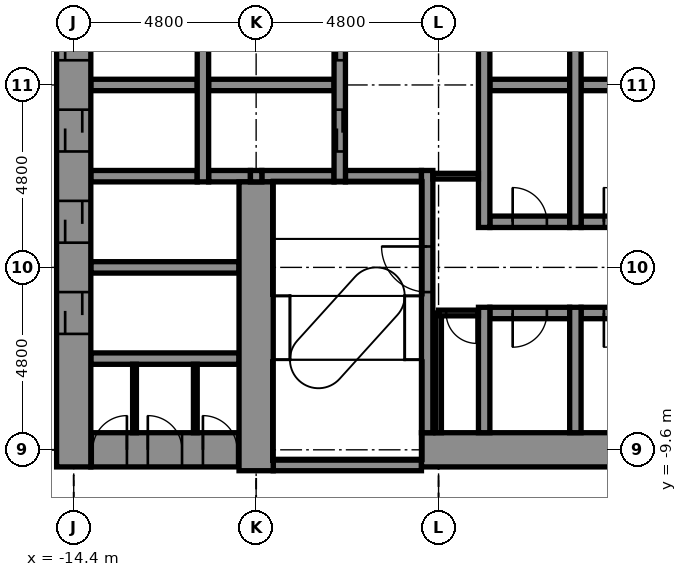
"""IFC4 building model, lengths in metres.
Left out: names, types, materials, properties, quantities, classifications, styles, units other than length and angle.
Written with IfcOpenShell. Run it as: python <this file> out.ifc"""

import sys

from ifc_helpers import new_model, si_unit, direction, frame, frame_2d, origin, place, context, subcontext, project, spatial, rectangle, extrude, element, fill, save


model = new_model("IFC4")
c1 = context("Model", 3, precision=1e-05, world=origin(), true_north=direction((0.0, 1.0)))
c2 = subcontext(c1, "Body", "Model", "MODEL_VIEW")
j1 = project(units=[si_unit("LENGTHUNIT", "METRE"), si_unit("PLANEANGLEUNIT", "RADIAN")], contexts=[c1])
p1 = place(None, origin())
s1 = spatial("IfcSite", under=j1, at=p1, CompositionType="ELEMENT")
p2 = place(p1, origin())
s2 = spatial("IfcBuilding", under=s1, at=p2, CompositionType="ELEMENT")
p3 = place(p2, frame((0.0, 0.0, 122.9)))
s3 = spatial("IfcBuildingStorey", under=s2, at=p3, CompositionType="ELEMENT", Elevation=122.9)
p4 = place(p3, frame((-9.15, -10.0, -0.2), z_axis=(0.0, 0.0, 1.0), x_axis=(1.0, 0.0, 0.0)))
e1 = element("IfcWall", 1, at=p4, inside=s3, PredefinedType="STANDARD", context=c2, shape_type="SweptSolid", body=[
    extrude(rectangle(XDim=3.9, YDim=0.3, at=frame_2d((1.95, 0.0))), origin(), (0.0, 0.0, 1.0), 4.4),
])
p5 = place(p3, frame((-13.95, -9.6, -0.2), z_axis=(0.0, 0.0, 1.0), x_axis=(1.0, 0.0, 0.0)))
e2 = element("IfcWall", 2, at=p5, inside=s3, PredefinedType="SHEAR", context=c2, shape_type="SweptSolid", body=[
    extrude(rectangle(XDim=3.9, YDim=0.9, at=frame_2d((1.95, 0.0))), origin(), (0.0, 0.0, 1.0), 4.4),
])
p6 = place(p5, frame((0.05, 0.0, 0.2)))
e3 = element("IfcOpeningElement", 3, at=p6, cuts=e2, PredefinedType="OPENING", context=c2, shape_type="SweptSolid", body=[
    extrude(rectangle(XDim=0.9, YDim=2.1, at=frame_2d((0.45, 1.05))), frame((0.0, 0.46, 0.0), z_axis=(0.0, -1.0, 0.0), x_axis=(1.0, 0.0, 0.0)), (0.0, 0.0, 1.0), 0.92),
])
p7 = place(p5, frame((1.5, 0.0, 0.2)))
e4 = element("IfcOpeningElement", 4, at=p7, cuts=e2, PredefinedType="OPENING", context=c2, shape_type="SweptSolid", body=[
    extrude(rectangle(XDim=0.9, YDim=2.1, at=frame_2d((0.45, 1.05))), frame((0.0, 0.46, 0.0), z_axis=(0.0, -1.0, 0.0), x_axis=(1.0, 0.0, 0.0)), (0.0, 0.0, 1.0), 0.92),
])
p8 = place(p5, frame((2.95, 0.0, 0.2)))
e5 = element("IfcOpeningElement", 5, at=p8, cuts=e2, PredefinedType="OPENING", context=c2, shape_type="SweptSolid", body=[
    extrude(rectangle(XDim=0.9, YDim=2.1, at=frame_2d((0.45, 1.05))), frame((0.0, 0.46, 0.0), z_axis=(0.0, -1.0, 0.0), x_axis=(1.0, 0.0, 0.0)), (0.0, 0.0, 1.0), 0.92),
])
p9 = place(p3, frame((-5.25, -9.6, -0.2), z_axis=(0.0, 0.0, 1.0), x_axis=(1.0, 0.0, 0.0)))
e6 = element("IfcWall", 6, at=p9, inside=s3, PredefinedType="SHEAR", context=c2, shape_type="SweptSolid", body=[
    extrude(rectangle(XDim=10.2, YDim=0.9, at=frame_2d((5.1, 0.0))), origin(), (0.0, 0.0, 1.0), 4.4),
])
p10 = place(p9, frame((9.0, 0.0, 0.2)))
e7 = element("IfcOpeningElement", 7, at=p10, cuts=e6, PredefinedType="OPENING", context=c2, shape_type="SweptSolid", body=[
    extrude(rectangle(XDim=0.9, YDim=2.1, at=frame_2d((0.45, 1.05))), frame((0.0, 0.46, 0.0), z_axis=(0.0, -1.0, 0.0), x_axis=(1.0, 0.0, 0.0)), (0.0, 0.0, 1.0), 0.92),
])
p11 = place(p3, frame((-13.95, -7.2, -0.2), z_axis=(0.0, 0.0, 1.0), x_axis=(1.0, 0.0, 0.0)))
e8 = element("IfcWall", 8, at=p11, inside=s3, PredefinedType="STANDARD", context=c2, shape_type="SweptSolid", body=[
    extrude(rectangle(XDim=3.9, YDim=0.3, at=frame_2d((1.95, 0.0))), origin(), (0.0, 0.0, 1.0), 4.4),
])
p12 = place(p3, frame((-3.45, -6.0, -0.2), z_axis=(0.0, 0.0, 1.0), x_axis=(1.0, 0.0, 0.0)))
e9 = element("IfcWall", 9, at=p12, inside=s3, PredefinedType="STANDARD", context=c2, shape_type="SweptSolid", body=[
    extrude(rectangle(XDim=2.1, YDim=0.3, at=frame_2d((1.05, 0.0))), origin(), (0.0, 0.0, 1.0), 4.4),
])
p13 = place(p12, frame((0.6, 0.0, 0.2)))
e10 = element("IfcOpeningElement", 10, at=p13, cuts=e9, PredefinedType="OPENING", context=c2, shape_type="SweptSolid", body=[
    extrude(rectangle(XDim=0.9, YDim=2.1, at=frame_2d((0.45, 1.05))), frame((0.0, 0.16, 0.0), z_axis=(0.0, -1.0, 0.0), x_axis=(1.0, 0.0, 0.0)), (0.0, 0.0, 1.0), 0.32),
])
p14 = place(p3, frame((-1.05, -6.0, -0.2), z_axis=(0.0, 0.0, 1.0), x_axis=(1.0, 0.0, 0.0)))
e11 = element("IfcWall", 11, at=p14, inside=s3, PredefinedType="STANDARD", context=c2, shape_type="SweptSolid", body=[
    extrude(rectangle(XDim=2.1, YDim=0.3, at=frame_2d((1.05, 0.0))), origin(), (0.0, 0.0, 1.0), 4.4),
])
p15 = place(p14, frame((0.6, 0.0, 0.2)))
e12 = element("IfcOpeningElement", 12, at=p15, cuts=e11, PredefinedType="OPENING", context=c2, shape_type="SweptSolid", body=[
    extrude(rectangle(XDim=0.9, YDim=2.1, at=frame_2d((0.45, 1.05))), frame((0.0, 0.16, 0.0), z_axis=(0.0, -1.0, 0.0), x_axis=(1.0, 0.0, 0.0)), (0.0, 0.0, 1.0), 0.32),
])
p16 = place(p3, frame((-13.95, -4.8, -0.2), z_axis=(0.0, 0.0, 1.0), x_axis=(1.0, 0.0, 0.0)))
e13 = element("IfcWall", 13, at=p16, inside=s3, PredefinedType="STANDARD", context=c2, shape_type="SweptSolid", body=[
    extrude(rectangle(XDim=3.9, YDim=0.3, at=frame_2d((1.95, 0.0))), origin(), (0.0, 0.0, 1.0), 4.4),
])
p17 = place(p3, frame((-3.45, -3.6, -0.2), z_axis=(0.0, 0.0, 1.0), x_axis=(1.0, 0.0, 0.0)))
e14 = element("IfcWall", 14, at=p17, inside=s3, PredefinedType="STANDARD", context=c2, shape_type="SweptSolid", body=[
    extrude(rectangle(XDim=2.1, YDim=0.3, at=frame_2d((1.05, 0.0))), origin(), (0.0, 0.0, 1.0), 4.4),
])
p18 = place(p17, frame((0.6, 0.0, 0.2)))
e15 = element("IfcOpeningElement", 15, at=p18, cuts=e14, PredefinedType="OPENING", context=c2, shape_type="SweptSolid", body=[
    extrude(rectangle(XDim=0.9, YDim=2.1, at=frame_2d((0.45, 1.05))), frame((0.0, 0.16, 0.0), z_axis=(0.0, -1.0, 0.0), x_axis=(1.0, 0.0, 0.0)), (0.0, 0.0, 1.0), 0.32),
])
p19 = place(p3, frame((-1.05, -3.6, -0.2), z_axis=(0.0, 0.0, 1.0), x_axis=(1.0, 0.0, 0.0)))
e16 = element("IfcWall", 16, at=p19, inside=s3, PredefinedType="STANDARD", context=c2, shape_type="SweptSolid", body=[
    extrude(rectangle(XDim=2.1, YDim=0.3, at=frame_2d((1.05, 0.0))), origin(), (0.0, 0.0, 1.0), 4.4),
])
p20 = place(p19, frame((0.6, 0.0, 0.2)))
e17 = element("IfcOpeningElement", 17, at=p20, cuts=e16, PredefinedType="OPENING", context=c2, shape_type="SweptSolid", body=[
    extrude(rectangle(XDim=0.9, YDim=2.1, at=frame_2d((0.45, 1.05))), frame((0.0, 0.16, 0.0), z_axis=(0.0, -1.0, 0.0), x_axis=(1.0, 0.0, 0.0)), (0.0, 0.0, 1.0), 0.32),
])
p21 = place(p3, frame((-13.95, -2.4, -0.2), z_axis=(0.0, 0.0, 1.0), x_axis=(1.0, 0.0, 0.0)))
e18 = element("IfcWall", 18, at=p21, inside=s3, PredefinedType="STANDARD", context=c2, shape_type="SweptSolid", body=[
    extrude(rectangle(XDim=2.8, YDim=0.3, at=frame_2d((1.4, 0.0))), origin(), (0.0, 0.0, 1.0), 4.4),
])
p22 = place(p3, frame((-10.85, -2.4, -0.2), z_axis=(0.0, 0.0, 1.0), x_axis=(1.0, 0.0, 0.0)))
e19 = element("IfcWall", 19, at=p22, inside=s3, PredefinedType="STANDARD", context=c2, shape_type="SweptSolid", body=[
    extrude(rectangle(XDim=1.1, YDim=0.3, at=frame_2d((0.55, 0.0))), origin(), (0.0, 0.0, 1.0), 4.4),
])
p23 = place(p3, frame((-9.45, -2.4, -0.2), z_axis=(0.0, 0.0, 1.0), x_axis=(1.0, 0.0, 0.0)))
e20 = element("IfcWall", 20, at=p23, inside=s3, PredefinedType="STANDARD", context=c2, shape_type="SweptSolid", body=[
    extrude(rectangle(XDim=1.9, YDim=0.3, at=frame_2d((0.95, 0.0))), origin(), (0.0, 0.0, 1.0), 4.4),
])
p24 = place(p3, frame((-7.25, -2.4, -0.2), z_axis=(0.0, 0.0, 1.0), x_axis=(1.0, 0.0, 0.0)))
e21 = element("IfcWall", 21, at=p24, inside=s3, PredefinedType="STANDARD", context=c2, shape_type="SweptSolid", body=[
    extrude(rectangle(XDim=2.0, YDim=0.3, at=frame_2d((1.0, 0.0))), origin(), (0.0, 0.0, 1.0), 4.4),
])
p25 = place(p3, frame((-13.95, 0.0, -0.2), z_axis=(0.0, 0.0, 1.0), x_axis=(1.0, 0.0, 0.0)))
e22 = element("IfcWall", 22, at=p25, inside=s3, PredefinedType="STANDARD", context=c2, shape_type="SweptSolid", body=[
    extrude(rectangle(XDim=2.8, YDim=0.3, at=frame_2d((1.4, 0.0))), origin(), (0.0, 0.0, 1.0), 4.4),
])
p26 = place(p3, frame((-10.85, 0.0, -0.2), z_axis=(0.0, 0.0, 1.0), x_axis=(1.0, 0.0, 0.0)))
e23 = element("IfcWall", 23, at=p26, inside=s3, PredefinedType="STANDARD", context=c2, shape_type="SweptSolid", body=[
    extrude(rectangle(XDim=3.3, YDim=0.3, at=frame_2d((1.65, 0.0))), origin(), (0.0, 0.0, 1.0), 4.4),
])
p27 = place(p3, frame((-3.45, 0.0, -0.2), z_axis=(0.0, 0.0, 1.0), x_axis=(1.0, 0.0, 0.0)))
e24 = element("IfcWall", 24, at=p27, inside=s3, PredefinedType="STANDARD", context=c2, shape_type="SweptSolid", body=[
    extrude(rectangle(XDim=2.1, YDim=0.3, at=frame_2d((1.05, 0.0))), origin(), (0.0, 0.0, 1.0), 4.4),
])
p28 = place(p3, frame((-1.05, 0.0, -0.2), z_axis=(0.0, 0.0, 1.0), x_axis=(1.0, 0.0, 0.0)))
e25 = element("IfcWall", 25, at=p28, inside=s3, PredefinedType="STANDARD", context=c2, shape_type="SweptSolid", body=[
    extrude(rectangle(XDim=2.1, YDim=0.3, at=frame_2d((1.05, 0.0))), origin(), (0.0, 0.0, 1.0), 4.4),
])
p29 = place(p3, frame((-14.4, -10.05, -0.2), z_axis=(0.0, 0.0, 1.0), x_axis=(0.0, 1.0, 0.0)))
e26 = element("IfcWall", 26, at=p29, inside=s3, PredefinedType="SHEAR", context=c2, shape_type="SweptSolid", body=[
    extrude(rectangle(XDim=20.1, YDim=0.9, at=frame_2d((10.05, 0.0))), origin(), (0.0, 0.0, 1.0), 4.4),
])
p30 = place(p29, frame((3.5, 0.0, 0.2)))
e27 = element("IfcOpeningElement", 27, at=p30, cuts=e26, PredefinedType="OPENING", context=c2, shape_type="SweptSolid", body=[
    extrude(rectangle(XDim=1.1, YDim=2.1, at=frame_2d((0.55, 1.05))), frame((0.0, 0.46, 0.0), z_axis=(0.0, -1.0, 0.0), x_axis=(1.0, 0.0, 0.0)), (0.0, 0.0, 1.0), 0.92),
])
p31 = place(p29, frame((5.9, 0.0, 0.2)))
e28 = element("IfcOpeningElement", 28, at=p31, cuts=e26, PredefinedType="OPENING", context=c2, shape_type="SweptSolid", body=[
    extrude(rectangle(XDim=1.1, YDim=2.1, at=frame_2d((0.55, 1.05))), frame((0.0, 0.46, 0.0), z_axis=(0.0, -1.0, 0.0), x_axis=(1.0, 0.0, 0.0)), (0.0, 0.0, 1.0), 0.92),
])
p32 = place(p29, frame((8.3, 0.0, 0.2)))
e29 = element("IfcOpeningElement", 29, at=p32, cuts=e26, PredefinedType="OPENING", context=c2, shape_type="SweptSolid", body=[
    extrude(rectangle(XDim=1.1, YDim=2.1, at=frame_2d((0.55, 1.05))), frame((0.0, 0.46, 0.0), z_axis=(0.0, -1.0, 0.0), x_axis=(1.0, 0.0, 0.0)), (0.0, 0.0, 1.0), 0.92),
])
p33 = place(p29, frame((10.7, 0.0, 0.2)))
e30 = element("IfcOpeningElement", 30, at=p33, cuts=e26, PredefinedType="OPENING", context=c2, shape_type="SweptSolid", body=[
    extrude(rectangle(XDim=1.1, YDim=2.1, at=frame_2d((0.55, 1.05))), frame((0.0, 0.46, 0.0), z_axis=(0.0, -1.0, 0.0), x_axis=(1.0, 0.0, 0.0)), (0.0, 0.0, 1.0), 0.92),
])
p34 = place(p3, frame((-11.0, -2.55, -0.2), z_axis=(0.0, 0.0, 1.0), x_axis=(0.0, 1.0, 0.0)))
e31 = element("IfcWall", 31, at=p34, inside=s3, PredefinedType="STANDARD", context=c2, shape_type="SweptSolid", body=[
    extrude(rectangle(XDim=5.1, YDim=0.3, at=frame_2d((2.55, 0.0))), origin(), (0.0, 0.0, 1.0), 4.4),
])
p35 = place(p3, frame((-9.6, -10.15, -0.2), z_axis=(0.0, 0.0, 1.0), x_axis=(0.0, 1.0, 0.0)))
e32 = element("IfcWall", 32, at=p35, inside=s3, PredefinedType="SHEAR", context=c2, shape_type="SweptSolid", body=[
    extrude(rectangle(XDim=7.6, YDim=0.9, at=frame_2d((3.8, 0.0))), origin(), (0.0, 0.0, 1.0), 4.4),
])
p36 = place(p3, frame((-9.6, -2.55, -0.2), z_axis=(0.0, 0.0, 1.0), x_axis=(0.0, 1.0, 0.0)))
e33 = element("IfcWall", 33, at=p36, inside=s3, PredefinedType="STANDARD", context=c2, shape_type="SweptSolid", body=[
    extrude(rectangle(XDim=0.3, YDim=0.3, at=frame_2d((0.15, 0.0))), origin(), (0.0, 0.0, 1.0), 4.4),
])
p37 = place(p3, frame((-7.4, -2.55, -0.2), z_axis=(0.0, 0.0, 1.0), x_axis=(0.0, 1.0, 0.0)))
e34 = element("IfcWall", 34, at=p37, inside=s3, PredefinedType="STANDARD", context=c2, shape_type="SweptSolid", body=[
    extrude(rectangle(XDim=5.1, YDim=0.3, at=frame_2d((2.55, 0.0))), origin(), (0.0, 0.0, 1.0), 4.4),
])
p38 = place(p37, frame((0.8, 0.0, 0.2)))
e35 = element("IfcOpeningElement", 35, at=p38, cuts=e34, PredefinedType="OPENING", context=c2, shape_type="SweptSolid", body=[
    extrude(rectangle(XDim=1.1, YDim=2.1, at=frame_2d((0.55, 1.05))), frame((0.0, 0.16, 0.0), z_axis=(0.0, -1.0, 0.0), x_axis=(1.0, 0.0, 0.0)), (0.0, 0.0, 1.0), 0.32),
])
p39 = place(p37, frame((3.2, 0.0, 0.2)))
e36 = element("IfcOpeningElement", 36, at=p39, cuts=e34, PredefinedType="OPENING", context=c2, shape_type="SweptSolid", body=[
    extrude(rectangle(XDim=1.1, YDim=2.1, at=frame_2d((0.55, 1.05))), frame((0.0, 0.16, 0.0), z_axis=(0.0, -1.0, 0.0), x_axis=(1.0, 0.0, 0.0)), (0.0, 0.0, 1.0), 0.32),
])
p40 = place(p3, frame((-5.1, -9.15, -0.2), z_axis=(0.0, 0.0, 1.0), x_axis=(0.0, 1.0, 0.0)))
e37 = element("IfcWall", 37, at=p40, inside=s3, PredefinedType="STANDARD", context=c2, shape_type="SweptSolid", body=[
    extrude(rectangle(XDim=6.9, YDim=0.3, at=frame_2d((3.45, 0.0))), origin(), (0.0, 0.0, 1.0), 4.4),
])
p41 = place(p40, frame((3.7, 0.0, 0.2)))
e38 = element("IfcOpeningElement", 38, at=p41, cuts=e37, PredefinedType="OPENING", context=c2, shape_type="SweptSolid", body=[
    extrude(rectangle(XDim=1.2, YDim=2.1, at=frame_2d((0.6, 1.05))), frame((0.0, 0.16, 0.0), z_axis=(0.0, -1.0, 0.0), x_axis=(1.0, 0.0, 0.0)), (0.0, 0.0, 1.0), 0.32),
])
p42 = place(p3, frame((-3.6, -9.15, -0.2), z_axis=(0.0, 0.0, 1.0), x_axis=(0.0, 1.0, 0.0)))
e39 = element("IfcWall", 39, at=p42, inside=s3, PredefinedType="STANDARD", context=c2, shape_type="SweptSolid", body=[
    extrude(rectangle(XDim=3.3, YDim=0.3, at=frame_2d((1.65, 0.0))), origin(), (0.0, 0.0, 1.0), 4.4),
])
p43 = place(p3, frame((-3.6, -3.75, -0.2), z_axis=(0.0, 0.0, 1.0), x_axis=(0.0, 1.0, 0.0)))
e40 = element("IfcWall", 40, at=p43, inside=s3, PredefinedType="STANDARD", context=c2, shape_type="SweptSolid", body=[
    extrude(rectangle(XDim=7.5, YDim=0.3, at=frame_2d((3.75, 0.0))), origin(), (0.0, 0.0, 1.0), 4.4),
])
p44 = place(p3, frame((-1.2, -9.15, -0.2), z_axis=(0.0, 0.0, 1.0), x_axis=(0.0, 1.0, 0.0)))
e41 = element("IfcWall", 41, at=p44, inside=s3, PredefinedType="STANDARD", context=c2, shape_type="SweptSolid", body=[
    extrude(rectangle(XDim=3.3, YDim=0.3, at=frame_2d((1.65, 0.0))), origin(), (0.0, 0.0, 1.0), 4.4),
])
p45 = place(p3, frame((-1.2, -3.75, -0.2), z_axis=(0.0, 0.0, 1.0), x_axis=(0.0, 1.0, 0.0)))
e42 = element("IfcWall", 42, at=p45, inside=s3, PredefinedType="STANDARD", context=c2, shape_type="SweptSolid", body=[
    extrude(rectangle(XDim=7.5, YDim=0.3, at=frame_2d((3.75, 0.0))), origin(), (0.0, 0.0, 1.0), 4.4),
])
p46 = place(p3, frame((-4.8, -9.15, 0.0), z_axis=(0.0, 0.0, 1.0), x_axis=(0.0, 1.0, 0.0)))
e43 = element("IfcWall", 43, at=p46, inside=s3, PredefinedType="PARTITIONING", context=c2, shape_type="SweptSolid", body=[
    extrude(rectangle(XDim=3.15, YDim=0.15, at=frame_2d((1.575, 0.0))), origin(), (0.0, 0.0, 1.0), 4.2),
])
for number, where, z_axis, x_axis in (
    (44, (-11.2, -9.15, 0.0), (0.0, 0.0, 1.0), (0.0, 1.0, 0.0)),
    (45, (-12.8, -9.15, 0.0), (0.0, 0.0, 1.0), (0.0, 1.0, 0.0)),
):
    element("IfcWall", number, at=place(p3, frame(where, z_axis=z_axis, x_axis=x_axis)), inside=s3, PredefinedType="PARTITIONING", context=c2, shape_type="SweptSolid", body=[
        extrude(rectangle(XDim=1.8, YDim=0.1, at=frame_2d((0.9, 0.0))), origin(), (0.0, 0.0, 1.0), 4.2),
    ])
p47 = place(p3, frame((-4.8, -6.0, 0.0), z_axis=(0.0, 0.0, 1.0), x_axis=(1.0, 0.0, 0.0)))
e46 = element("IfcWall", 46, at=p47, inside=s3, PredefinedType="PARTITIONING", context=c2, shape_type="SweptSolid", body=[
    extrude(rectangle(XDim=1.05, YDim=0.15, at=frame_2d((0.525, 0.0))), origin(), (0.0, 0.0, 1.0), 4.2),
])
p48 = place(p47, frame((0.2, 0.0, 0.0)))
e47 = element("IfcOpeningElement", 47, at=p48, cuts=e46, PredefinedType="OPENING", context=c2, shape_type="SweptSolid", body=[
    extrude(rectangle(XDim=0.8, YDim=2.1, at=frame_2d((0.4, 1.05))), frame((0.0, 0.085, 0.0), z_axis=(0.0, -1.0, 0.0), x_axis=(1.0, 0.0, 0.0)), (0.0, 0.0, 1.0), 0.17),
])
p49 = place(p3, frame((-4.95, -2.4, 0.0), z_axis=(0.0, 0.0, 1.0), x_axis=(1.0, 0.0, 0.0)))
e48 = element("IfcWall", 48, at=p49, inside=s3, PredefinedType="PARTITIONING", context=c2, shape_type="SweptSolid", body=[
    extrude(rectangle(XDim=1.2, YDim=0.15, at=frame_2d((0.6, 0.0))), origin(), (0.0, 0.0, 1.0), 4.2),
])
p50 = place(p48, frame((0.8, 0.0, 0.0), z_axis=(0.0, 0.0, 1.0), x_axis=(-1.0, 0.0, 0.0)))
e49 = element("IfcDoor", 49, at=p50, inside=s3, OperationType="SINGLE_SWING_RIGHT", PredefinedType="DOOR", context=c2, shape_type="SweptSolid", body=[
    extrude(rectangle(XDim=0.8, YDim=2.1, at=frame_2d((0.4, 1.05))), frame((0.0, 0.025, 0.0), z_axis=(0.0, -1.0, 0.0), x_axis=(1.0, 0.0, 0.0)), (0.0, 0.0, 1.0), 0.05),
])
fill(e47, e49)
p51 = place(p38, origin())
e50 = element("IfcDoor", 50, at=p51, inside=s3, OperationType="DOUBLE_DOOR_SLIDING", PredefinedType="DOOR", context=c2, shape_type="SweptSolid", body=[
    extrude(rectangle(XDim=1.1, YDim=2.1, at=frame_2d((0.55, 1.05))), frame((0.0, 0.025, 0.0), z_axis=(0.0, -1.0, 0.0), x_axis=(1.0, 0.0, 0.0)), (0.0, 0.0, 1.0), 0.05),
])
fill(e35, e50)
p52 = place(p39, origin())
e51 = element("IfcDoor", 51, at=p52, inside=s3, OperationType="DOUBLE_DOOR_SLIDING", PredefinedType="DOOR", context=c2, shape_type="SweptSolid", body=[
    extrude(rectangle(XDim=1.1, YDim=2.1, at=frame_2d((0.55, 1.05))), frame((0.0, 0.025, 0.0), z_axis=(0.0, -1.0, 0.0), x_axis=(1.0, 0.0, 0.0)), (0.0, 0.0, 1.0), 0.05),
])
fill(e36, e51)
p53 = place(p30, origin())
e52 = element("IfcDoor", 52, at=p53, inside=s3, OperationType="DOUBLE_DOOR_SLIDING", PredefinedType="DOOR", context=c2, shape_type="SweptSolid", body=[
    extrude(rectangle(XDim=1.1, YDim=2.1, at=frame_2d((0.55, 1.05))), frame((0.0, 0.025, 0.0), z_axis=(0.0, -1.0, 0.0), x_axis=(1.0, 0.0, 0.0)), (0.0, 0.0, 1.0), 0.05),
])
fill(e27, e52)
p54 = place(p31, origin())
e53 = element("IfcDoor", 53, at=p54, inside=s3, OperationType="DOUBLE_DOOR_SLIDING", PredefinedType="DOOR", context=c2, shape_type="SweptSolid", body=[
    extrude(rectangle(XDim=1.1, YDim=2.1, at=frame_2d((0.55, 1.05))), frame((0.0, 0.025, 0.0), z_axis=(0.0, -1.0, 0.0), x_axis=(1.0, 0.0, 0.0)), (0.0, 0.0, 1.0), 0.05),
])
fill(e28, e53)
p55 = place(p32, origin())
e54 = element("IfcDoor", 54, at=p55, inside=s3, OperationType="DOUBLE_DOOR_SLIDING", PredefinedType="DOOR", context=c2, shape_type="SweptSolid", body=[
    extrude(rectangle(XDim=1.1, YDim=2.1, at=frame_2d((0.55, 1.05))), frame((0.0, 0.025, 0.0), z_axis=(0.0, -1.0, 0.0), x_axis=(1.0, 0.0, 0.0)), (0.0, 0.0, 1.0), 0.05),
])
fill(e29, e54)
p56 = place(p33, origin())
e55 = element("IfcDoor", 55, at=p56, inside=s3, OperationType="DOUBLE_DOOR_SLIDING", PredefinedType="DOOR", context=c2, shape_type="SweptSolid", body=[
    extrude(rectangle(XDim=1.1, YDim=2.1, at=frame_2d((0.55, 1.05))), frame((0.0, 0.025, 0.0), z_axis=(0.0, -1.0, 0.0), x_axis=(1.0, 0.0, 0.0)), (0.0, 0.0, 1.0), 0.05),
])
fill(e30, e55)
p57 = place(p41, origin())
e56 = element("IfcDoor", 56, at=p57, inside=s3, OperationType="SINGLE_SWING_RIGHT", PredefinedType="DOOR", context=c2, shape_type="SweptSolid", body=[
    extrude(rectangle(XDim=1.2, YDim=2.1, at=frame_2d((0.6, 1.05))), frame((0.0, 0.025, 0.0), z_axis=(0.0, -1.0, 0.0), x_axis=(1.0, 0.0, 0.0)), (0.0, 0.0, 1.0), 0.05),
])
fill(e38, e56)
p58 = place(p18, origin())
e57 = element("IfcDoor", 57, at=p58, inside=s3, OperationType="SINGLE_SWING_LEFT", PredefinedType="DOOR", context=c2, shape_type="SweptSolid", body=[
    extrude(rectangle(XDim=0.9, YDim=2.1, at=frame_2d((0.45, 1.05))), frame((0.0, 0.025, 0.0), z_axis=(0.0, -1.0, 0.0), x_axis=(1.0, 0.0, 0.0)), (0.0, 0.0, 1.0), 0.05),
])
fill(e15, e57)
p59 = place(p20, origin())
e58 = element("IfcDoor", 58, at=p59, inside=s3, OperationType="SINGLE_SWING_LEFT", PredefinedType="DOOR", context=c2, shape_type="SweptSolid", body=[
    extrude(rectangle(XDim=0.9, YDim=2.1, at=frame_2d((0.45, 1.05))), frame((0.0, 0.025, 0.0), z_axis=(0.0, -1.0, 0.0), x_axis=(1.0, 0.0, 0.0)), (0.0, 0.0, 1.0), 0.05),
])
fill(e17, e58)
p60 = place(p13, frame((0.9, 0.0, 0.0), z_axis=(0.0, 0.0, 1.0), x_axis=(-1.0, 0.0, 0.0)))
e59 = element("IfcDoor", 59, at=p60, inside=s3, OperationType="SINGLE_SWING_LEFT", PredefinedType="DOOR", context=c2, shape_type="SweptSolid", body=[
    extrude(rectangle(XDim=0.9, YDim=2.1, at=frame_2d((0.45, 1.05))), frame((0.0, 0.025, 0.0), z_axis=(0.0, -1.0, 0.0), x_axis=(1.0, 0.0, 0.0)), (0.0, 0.0, 1.0), 0.05),
])
fill(e10, e59)
p61 = place(p15, frame((0.9, 0.0, 0.0), z_axis=(0.0, 0.0, 1.0), x_axis=(-1.0, 0.0, 0.0)))
e60 = element("IfcDoor", 60, at=p61, inside=s3, OperationType="SINGLE_SWING_LEFT", PredefinedType="DOOR", context=c2, shape_type="SweptSolid", body=[
    extrude(rectangle(XDim=0.9, YDim=2.1, at=frame_2d((0.45, 1.05))), frame((0.0, 0.025, 0.0), z_axis=(0.0, -1.0, 0.0), x_axis=(1.0, 0.0, 0.0)), (0.0, 0.0, 1.0), 0.05),
])
fill(e12, e60)
p62 = place(p6, origin())
e61 = element("IfcDoor", 61, at=p62, inside=s3, OperationType="SINGLE_SWING_RIGHT", PredefinedType="DOOR", context=c2, shape_type="SweptSolid", body=[
    extrude(rectangle(XDim=0.9, YDim=2.1, at=frame_2d((0.45, 1.05))), frame((0.0, 0.025, 0.0), z_axis=(0.0, -1.0, 0.0), x_axis=(1.0, 0.0, 0.0)), (0.0, 0.0, 1.0), 0.05),
])
fill(e3, e61)
p63 = place(p7, origin())
e62 = element("IfcDoor", 62, at=p63, inside=s3, OperationType="SINGLE_SWING_LEFT", PredefinedType="DOOR", context=c2, shape_type="SweptSolid", body=[
    extrude(rectangle(XDim=0.9, YDim=2.1, at=frame_2d((0.45, 1.05))), frame((0.0, 0.025, 0.0), z_axis=(0.0, -1.0, 0.0), x_axis=(1.0, 0.0, 0.0)), (0.0, 0.0, 1.0), 0.05),
])
fill(e4, e62)
p64 = place(p8, origin())
e63 = element("IfcDoor", 63, at=p64, inside=s3, OperationType="SINGLE_SWING_LEFT", PredefinedType="DOOR", context=c2, shape_type="SweptSolid", body=[
    extrude(rectangle(XDim=0.9, YDim=2.1, at=frame_2d((0.45, 1.05))), frame((0.0, 0.025, 0.0), z_axis=(0.0, -1.0, 0.0), x_axis=(1.0, 0.0, 0.0)), (0.0, 0.0, 1.0), 0.05),
])
fill(e5, e63)
save(model, sys.argv[1])
